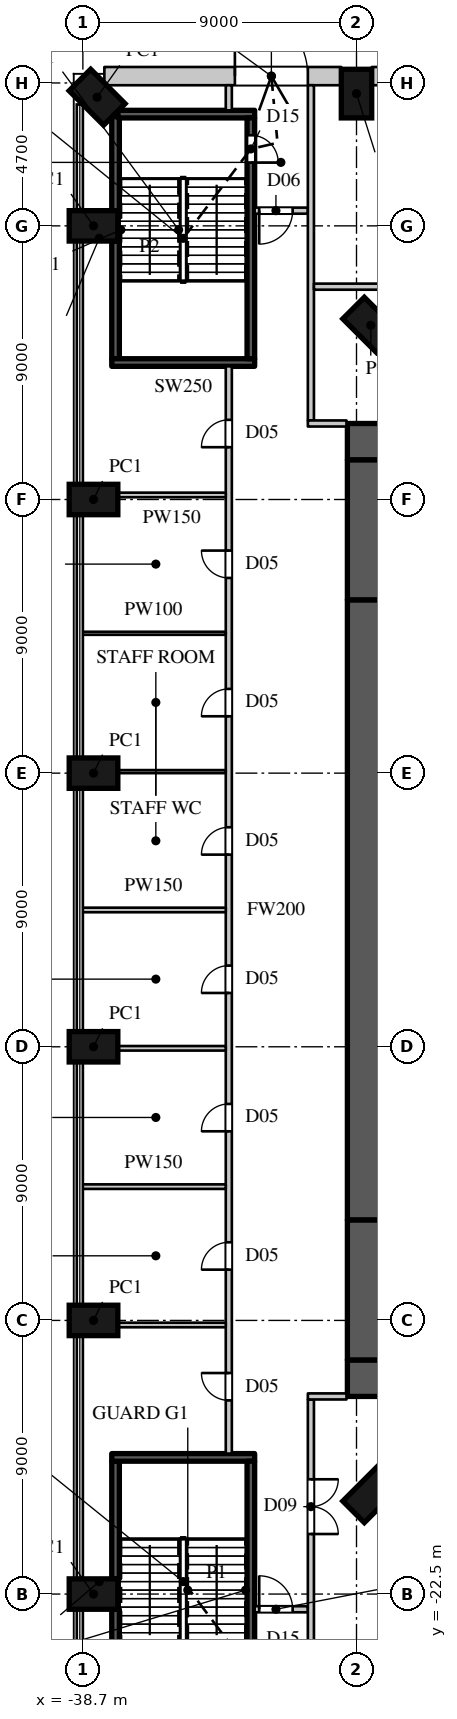
"""IFC4 building model, lengths in metres.
Left out: names, types, materials, properties, quantities, classifications, styles, units other than length and angle.
Written with IfcOpenShell. Run it as: python <this file> out.ifc"""

import sys

from ifc_helpers import new_model, si_unit, direction, frame, frame_2d, origin, origin_2d, place, context, subcontext, project, spatial, rectangle, extrude, element, fill, save


model = new_model("IFC4")
c1 = context("Model", 3, precision=1e-05, world=origin(), true_north=direction((0.0, 1.0)))
c2 = subcontext(c1, "Body", "Model", "MODEL_VIEW")
j1 = project(units=[si_unit("LENGTHUNIT", "METRE"), si_unit("PLANEANGLEUNIT", "RADIAN")], contexts=[c1])
p1 = place(None, origin())
s1 = spatial("IfcSite", under=j1, at=p1, CompositionType="ELEMENT")
p2 = place(p1, origin())
s2 = spatial("IfcBuilding", under=s1, at=p2, CompositionType="ELEMENT")
p3 = place(p2, origin())
s3 = spatial("IfcBuildingStorey", under=s2, at=p3, CompositionType="ELEMENT", Elevation=0.0)
for number, where, z_axis, x_axis in (
    (1, (-29.231, 19.231, 0.0), (0.0, 0.0, 1.0), (-0.707, -0.707, 0.0)),
    (2, (-29.231, -19.231, 0.0), (0.0, 0.0, 1.0), (0.707, -0.707, 0.0)),
    (3, (-29.7, 26.85, 0.0), (0.0, 0.0, 1.0), (-1.0, 0.0, 0.0)),
    (4, (-38.231, 26.731, 0.0), (0.0, 0.0, 1.0), (-0.707, -0.707, 0.0)),
    (5, (-38.35, 22.5, 0.0), (0.0, 0.0, 1.0), (0.0, -1.0, 0.0)),
    (6, (-38.35, 13.5, 0.0), (0.0, 0.0, 1.0), (0.0, -1.0, 0.0)),
    (7, (-38.35, 4.5, 0.0), (0.0, 0.0, 1.0), (0.0, -1.0, 0.0)),
    (8, (-38.35, -4.5, 0.0), (0.0, 0.0, 1.0), (0.0, -1.0, 0.0)),
    (9, (-38.35, -13.5, 0.0), (0.0, 0.0, 1.0), (0.0, -1.0, 0.0)),
    (10, (-38.35, -22.5, 0.0), (0.0, 0.0, 1.0), (0.0, -1.0, 0.0)),
):
    element("IfcColumn", number, at=place(p3, frame(where, z_axis=z_axis, x_axis=x_axis)), inside=s3, PredefinedType="COLUMN", context=c2, shape_type="SweptSolid", body=[
        extrude(rectangle(XDim=1.0, YDim=1.6, at=origin_2d()), origin(), (0.0, 0.0, 1.0), 9.0),
    ])
p4 = place(p3, frame((-21.15, 27.425, 0.0), z_axis=(0.0, 0.0, 1.0), x_axis=(-1.0, 0.0, 0.0)))
e11 = element("IfcWall", 11, at=p4, inside=s3, PredefinedType="ELEMENTEDWALL", context=c2, shape_type="SweptSolid", body=[
    extrude(rectangle(XDim=8.05, YDim=0.6, at=frame_2d((4.025, 0.0))), origin(), (0.0, 0.0, 1.0), 8.6),
])
p5 = place(p4, frame((4.45, 0.0, 0.0)))
e12 = element("IfcOpeningElement", 12, at=p5, cuts=e11, PredefinedType="OPENING", context=c2, shape_type="SweptSolid", body=[
    extrude(rectangle(XDim=2.4, YDim=3.0, at=frame_2d((1.2, 1.5))), frame((0.0, 0.31, 0.0), z_axis=(0.0, -1.0, 0.0), x_axis=(1.0, 0.0, 0.0)), (0.0, 0.0, 1.0), 0.62),
])
p6 = place(p3, frame((-37.993, 27.425, 0.0), z_axis=(0.0, 0.0, 1.0), x_axis=(1.0, 0.0, 0.0)))
e13 = element("IfcWall", 13, at=p6, inside=s3, PredefinedType="ELEMENTEDWALL", context=c2, shape_type="SweptSolid", body=[
    extrude(rectangle(XDim=7.793, YDim=0.6, at=frame_2d((3.896, 0.0))), origin(), (0.0, 0.0, 1.0), 8.6),
])
p7 = place(p6, frame((4.293, 0.0, 0.0)))
e14 = element("IfcOpeningElement", 14, at=p7, cuts=e13, PredefinedType="OPENING", context=c2, shape_type="SweptSolid", body=[
    extrude(rectangle(XDim=2.4, YDim=3.0, at=frame_2d((1.2, 1.5))), frame((0.0, 0.31, 0.0), z_axis=(0.0, -1.0, 0.0), x_axis=(1.0, 0.0, 0.0)), (0.0, 0.0, 1.0), 0.62),
])
for number, where, z_axis, x_axis in (
    (15, (-30.0, 15.4, 0.0), (0.0, 0.0, 1.0), (1.0, 0.0, 0.0)),
    (16, (-30.0, -15.4, 0.0), (0.0, 0.0, 1.0), (1.0, 0.0, 0.0)),
):
    element("IfcWall", number, at=place(p3, frame(where, z_axis=z_axis, x_axis=x_axis)), inside=s3, PredefinedType="SHEAR", context=c2, shape_type="SweptSolid", body=[
        extrude(rectangle(XDim=16.0, YDim=1.2, at=frame_2d((8.0, 0.0))), origin(), (0.0, 0.0, 1.0), 9.0),
    ])
p8 = place(p3, frame((-29.4, -10.2, 0.0), z_axis=(0.0, 0.0, 1.0), x_axis=(0.0, 1.0, 0.0)))
e17 = element("IfcWall", 17, at=p8, inside=s3, PredefinedType="SHEAR", context=c2, shape_type="SweptSolid", body=[
    extrude(rectangle(XDim=20.4, YDim=1.2, at=frame_2d((10.2, 0.0))), origin(), (0.0, 0.0, 1.0), 9.0),
])
for number, where, z_axis, x_axis in (
    (18, (-29.4, -14.8, 0.0), (0.0, 0.0, 1.0), (0.0, 1.0, 0.0)),
    (19, (-29.4, 10.2, 0.0), (0.0, 0.0, 1.0), (0.0, 1.0, 0.0)),
):
    element("IfcWall", number, at=place(p3, frame(where, z_axis=z_axis, x_axis=x_axis)), inside=s3, PredefinedType="SHEAR", context=c2, shape_type="SweptSolid", body=[
        extrude(rectangle(XDim=4.6, YDim=1.2, at=frame_2d((2.3, 0.0))), origin(), (0.0, 0.0, 1.0), 9.0),
    ])
p9 = place(p3, frame((-33.9, -17.88, 0.0), z_axis=(0.0, 0.0, 1.0), x_axis=(0.0, 1.0, 0.0)))
e20 = element("IfcWall", 20, at=p9, inside=s3, PredefinedType="PARTITIONING", context=c2, shape_type="SweptSolid", body=[
    extrude(rectangle(XDim=35.76, YDim=0.2, at=frame_2d((17.88, 0.0))), origin(), (0.0, 0.0, 1.0), 8.598),
])
p10 = place(p9, frame((1.75, 0.0, 0.0)))
e21 = element("IfcOpeningElement", 21, at=p10, cuts=e20, PredefinedType="OPENING", context=c2, shape_type="SweptSolid", body=[
    extrude(rectangle(XDim=0.9, YDim=2.2, at=frame_2d((0.45, 1.1))), frame((0.0, 0.11, 0.0), z_axis=(0.0, -1.0, 0.0), x_axis=(1.0, 0.0, 0.0)), (0.0, 0.0, 1.0), 0.22),
])
p11 = place(p9, frame((6.05, 0.0, 0.0)))
e22 = element("IfcOpeningElement", 22, at=p11, cuts=e20, PredefinedType="OPENING", context=c2, shape_type="SweptSolid", body=[
    extrude(rectangle(XDim=0.9, YDim=2.2, at=frame_2d((0.45, 1.1))), frame((0.0, 0.11, 0.0), z_axis=(0.0, -1.0, 0.0), x_axis=(1.0, 0.0, 0.0)), (0.0, 0.0, 1.0), 0.22),
])
p12 = place(p9, frame((10.6, 0.0, 0.0)))
e23 = element("IfcOpeningElement", 23, at=p12, cuts=e20, PredefinedType="OPENING", context=c2, shape_type="SweptSolid", body=[
    extrude(rectangle(XDim=0.9, YDim=2.2, at=frame_2d((0.45, 1.1))), frame((0.0, 0.11, 0.0), z_axis=(0.0, -1.0, 0.0), x_axis=(1.0, 0.0, 0.0)), (0.0, 0.0, 1.0), 0.22),
])
p13 = place(p9, frame((15.15, 0.0, 0.0)))
e24 = element("IfcOpeningElement", 24, at=p13, cuts=e20, PredefinedType="OPENING", context=c2, shape_type="SweptSolid", body=[
    extrude(rectangle(XDim=0.9, YDim=2.2, at=frame_2d((0.45, 1.1))), frame((0.0, 0.11, 0.0), z_axis=(0.0, -1.0, 0.0), x_axis=(1.0, 0.0, 0.0)), (0.0, 0.0, 1.0), 0.22),
])
p14 = place(p9, frame((19.7, 0.0, 0.0)))
e25 = element("IfcOpeningElement", 25, at=p14, cuts=e20, PredefinedType="OPENING", context=c2, shape_type="SweptSolid", body=[
    extrude(rectangle(XDim=0.9, YDim=2.2, at=frame_2d((0.45, 1.1))), frame((0.0, 0.11, 0.0), z_axis=(0.0, -1.0, 0.0), x_axis=(1.0, 0.0, 0.0)), (0.0, 0.0, 1.0), 0.22),
])
p15 = place(p9, frame((24.25, 0.0, 0.0)))
e26 = element("IfcOpeningElement", 26, at=p15, cuts=e20, PredefinedType="OPENING", context=c2, shape_type="SweptSolid", body=[
    extrude(rectangle(XDim=0.9, YDim=2.2, at=frame_2d((0.45, 1.1))), frame((0.0, 0.11, 0.0), z_axis=(0.0, -1.0, 0.0), x_axis=(1.0, 0.0, 0.0)), (0.0, 0.0, 1.0), 0.22),
])
p16 = place(p9, frame((28.8, 0.0, 0.0)))
e27 = element("IfcOpeningElement", 27, at=p16, cuts=e20, PredefinedType="OPENING", context=c2, shape_type="SweptSolid", body=[
    extrude(rectangle(XDim=0.9, YDim=2.2, at=frame_2d((0.45, 1.1))), frame((0.0, 0.11, 0.0), z_axis=(0.0, -1.0, 0.0), x_axis=(1.0, 0.0, 0.0)), (0.0, 0.0, 1.0), 0.22),
])
p17 = place(p9, frame((33.1, 0.0, 0.0)))
e28 = element("IfcOpeningElement", 28, at=p17, cuts=e20, PredefinedType="OPENING", context=c2, shape_type="SweptSolid", body=[
    extrude(rectangle(XDim=0.9, YDim=2.2, at=frame_2d((0.45, 1.1))), frame((0.0, 0.11, 0.0), z_axis=(0.0, -1.0, 0.0), x_axis=(1.0, 0.0, 0.0)), (0.0, 0.0, 1.0), 0.22),
])
p18 = place(p3, frame((-33.9, 26.3, 0.0), z_axis=(0.0, 0.0, 1.0), x_axis=(0.0, 1.0, 0.0)))
e29 = element("IfcWall", 29, at=p18, inside=s3, PredefinedType="PARTITIONING", context=c2, shape_type="SweptSolid", body=[
    extrude(rectangle(XDim=0.825, YDim=0.2, at=frame_2d((0.413, 0.0))), origin(), (0.0, 0.0, 1.0), 8.598),
])
p19 = place(p3, frame((-33.05, -23.0, 0.0), z_axis=(0.0, 0.0, 1.0), x_axis=(1.0, 0.0, 0.0)))
e30 = element("IfcWall", 30, at=p19, inside=s3, PredefinedType="PARTITIONING", context=c2, shape_type="SweptSolid", body=[
    extrude(rectangle(XDim=1.75, YDim=0.2, at=frame_2d((0.875, 0.0))), origin(), (0.0, 0.0, 1.0), 8.598),
])
p20 = place(p19, frame((0.15, 0.0, 0.0)))
e31 = element("IfcOpeningElement", 31, at=p20, cuts=e30, PredefinedType="OPENING", context=c2, shape_type="SweptSolid", body=[
    extrude(rectangle(XDim=1.1, YDim=2.2, at=frame_2d((0.55, 1.1))), frame((0.0, 0.11, 0.0), z_axis=(0.0, -1.0, 0.0), x_axis=(1.0, 0.0, 0.0)), (0.0, 0.0, 1.0), 0.22),
])
p21 = place(p3, frame((-33.05, 23.0, 0.0), z_axis=(0.0, 0.0, 1.0), x_axis=(1.0, 0.0, 0.0)))
e32 = element("IfcWall", 32, at=p21, inside=s3, PredefinedType="PARTITIONING", context=c2, shape_type="SweptSolid", body=[
    extrude(rectangle(XDim=1.75, YDim=0.2, at=frame_2d((0.875, 0.0))), origin(), (0.0, 0.0, 1.0), 8.598),
])
p22 = place(p21, frame((0.15, 0.0, 0.0)))
e33 = element("IfcOpeningElement", 33, at=p22, cuts=e32, PredefinedType="OPENING", context=c2, shape_type="SweptSolid", body=[
    extrude(rectangle(XDim=1.1, YDim=2.2, at=frame_2d((0.55, 1.1))), frame((0.0, 0.11, 0.0), z_axis=(0.0, -1.0, 0.0), x_axis=(1.0, 0.0, 0.0)), (0.0, 0.0, 1.0), 0.22),
])
p23 = place(p3, frame((-31.2, -27.125, 0.0), z_axis=(0.0, 0.0, 1.0), x_axis=(0.0, 1.0, 0.0)))
e34 = element("IfcWall", 34, at=p23, inside=s3, PredefinedType="PARTITIONING", context=c2, shape_type="SweptSolid", body=[
    extrude(rectangle(XDim=11.025, YDim=0.2, at=frame_2d((5.512, 0.0))), origin(), (0.0, 0.0, 1.0), 8.598),
])
p24 = place(p23, frame((6.6, 0.0, 0.0)))
e35 = element("IfcOpeningElement", 35, at=p24, cuts=e34, PredefinedType="OPENING", context=c2, shape_type="SweptSolid", body=[
    extrude(rectangle(XDim=1.8, YDim=2.4, at=frame_2d((0.9, 1.2))), frame((0.0, 0.11, 0.0), z_axis=(0.0, -1.0, 0.0), x_axis=(1.0, 0.0, 0.0)), (0.0, 0.0, 1.0), 0.22),
])
p25 = place(p3, frame((-31.3, -16.0, 0.0), z_axis=(0.0, 0.0, 1.0), x_axis=(1.0, 0.0, 0.0)))
e36 = element("IfcWall", 36, at=p25, inside=s3, PredefinedType="PARTITIONING", context=c2, shape_type="SweptSolid", body=[
    extrude(rectangle(XDim=1.27, YDim=0.2, at=frame_2d((0.635, 0.0))), origin(), (0.0, 0.0, 1.0), 8.598),
])
p26 = place(p3, frame((-31.2, 16.1, 0.0), z_axis=(0.0, 0.0, 1.0), x_axis=(0.0, 1.0, 0.0)))
e37 = element("IfcWall", 37, at=p26, inside=s3, PredefinedType="PARTITIONING", context=c2, shape_type="SweptSolid", body=[
    extrude(rectangle(XDim=11.025, YDim=0.2, at=frame_2d((5.512, 0.0))), origin(), (0.0, 0.0, 1.0), 8.598),
])
p27 = place(p3, frame((-31.3, 16.0, 0.0), z_axis=(0.0, 0.0, 1.0), x_axis=(1.0, 0.0, 0.0)))
e38 = element("IfcWall", 38, at=p27, inside=s3, PredefinedType="PARTITIONING", context=c2, shape_type="SweptSolid", body=[
    extrude(rectangle(XDim=1.27, YDim=0.2, at=frame_2d((0.635, 0.0))), origin(), (0.0, 0.0, 1.0), 8.598),
])
p28 = place(p3, frame((-31.1, 20.5, 0.0), z_axis=(0.0, 0.0, 1.0), x_axis=(1.0, 0.0, 0.0)))
e39 = element("IfcWall", 39, at=p28, inside=s3, PredefinedType="PARTITIONING", context=c2, shape_type="SweptSolid", body=[
    extrude(rectangle(XDim=5.0, YDim=0.2, at=frame_2d((2.5, 0.0))), origin(), (0.0, 0.0, 1.0), 8.598),
])
p29 = place(p28, frame((2.35, 0.0, 0.0)))
e40 = element("IfcOpeningElement", 40, at=p29, cuts=e39, PredefinedType="OPENING", context=c2, shape_type="SweptSolid", body=[
    extrude(rectangle(XDim=0.95, YDim=2.2, at=frame_2d((0.475, 1.1))), frame((0.0, 0.11, 0.0), z_axis=(0.0, -1.0, 0.0), x_axis=(1.0, 0.0, 0.0)), (0.0, 0.0, 1.0), 0.22),
])
p30 = place(p3, frame((-37.55, -13.65, 0.0), z_axis=(0.0, 0.0, 1.0), x_axis=(1.0, 0.0, 0.0)))
e41 = element("IfcWall", 41, at=p30, inside=s3, PredefinedType="PARTITIONING", context=c2, shape_type="SweptSolid", body=[
    extrude(rectangle(XDim=3.55, YDim=0.15, at=frame_2d((1.775, 0.0))), origin(), (0.0, 0.0, 1.0), 8.598),
])
p31 = place(p3, frame((-38.755, -9.1, 0.0), z_axis=(0.0, 0.0, 1.0), x_axis=(1.0, 0.0, 0.0)))
e42 = element("IfcWall", 42, at=p31, inside=s3, PredefinedType="PARTITIONING", context=c2, shape_type="SweptSolid", body=[
    extrude(rectangle(XDim=4.755, YDim=0.15, at=frame_2d((2.377, 0.0))), origin(), (0.0, 0.0, 1.0), 8.598),
])
p32 = place(p3, frame((-37.55, -4.55, 0.0), z_axis=(0.0, 0.0, 1.0), x_axis=(1.0, 0.0, 0.0)))
e43 = element("IfcWall", 43, at=p32, inside=s3, PredefinedType="PARTITIONING", context=c2, shape_type="SweptSolid", body=[
    extrude(rectangle(XDim=3.55, YDim=0.15, at=frame_2d((1.775, 0.0))), origin(), (0.0, 0.0, 1.0), 8.598),
])
p33 = place(p3, frame((-38.755, 0.0, 0.0), z_axis=(0.0, 0.0, 1.0), x_axis=(1.0, 0.0, 0.0)))
e44 = element("IfcWall", 44, at=p33, inside=s3, PredefinedType="PARTITIONING", context=c2, shape_type="SweptSolid", body=[
    extrude(rectangle(XDim=4.755, YDim=0.15, at=frame_2d((2.377, 0.0))), origin(), (0.0, 0.0, 1.0), 8.598),
])
p34 = place(p3, frame((-37.55, 13.65, 0.0), z_axis=(0.0, 0.0, 1.0), x_axis=(1.0, 0.0, 0.0)))
e45 = element("IfcWall", 45, at=p34, inside=s3, PredefinedType="PARTITIONING", context=c2, shape_type="SweptSolid", body=[
    extrude(rectangle(XDim=3.55, YDim=0.15, at=frame_2d((1.775, 0.0))), origin(), (0.0, 0.0, 1.0), 8.598),
])
p35 = place(p3, frame((-37.625, -26.095, 0.0), z_axis=(0.0, 0.0, 1.0), x_axis=(0.0, 1.0, 0.0)))
e46 = element("IfcWall", 46, at=p35, inside=s3, PredefinedType="SHEAR", context=c2, shape_type="SweptSolid", body=[
    extrude(rectangle(XDim=3.095, YDim=0.25, at=frame_2d((1.548, 0.0))), origin(), (0.0, 0.0, 1.0), 8.6),
])
p36 = place(p3, frame((-37.625, -22.0, 0.0), z_axis=(0.0, 0.0, 1.0), x_axis=(0.0, 1.0, 0.0)))
e47 = element("IfcWall", 47, at=p36, inside=s3, PredefinedType="SHEAR", context=c2, shape_type="SweptSolid", body=[
    extrude(rectangle(XDim=3.87, YDim=0.25, at=frame_2d((1.935, 0.0))), origin(), (0.0, 0.0, 1.0), 8.6),
])
p37 = place(p3, frame((-37.75, -18.005, 0.0), z_axis=(0.0, 0.0, 1.0), x_axis=(1.0, 0.0, 0.0)))
e48 = element("IfcWall", 48, at=p37, inside=s3, PredefinedType="SHEAR", context=c2, shape_type="SweptSolid", body=[
    extrude(rectangle(XDim=4.7, YDim=0.25, at=frame_2d((2.35, 0.0))), origin(), (0.0, 0.0, 1.0), 8.6),
])
p38 = place(p3, frame((-37.625, 18.13, 0.0), z_axis=(0.0, 0.0, 1.0), x_axis=(0.0, 1.0, 0.0)))
e49 = element("IfcWall", 49, at=p38, inside=s3, PredefinedType="SHEAR", context=c2, shape_type="SweptSolid", body=[
    extrude(rectangle(XDim=3.87, YDim=0.25, at=frame_2d((1.935, 0.0))), origin(), (0.0, 0.0, 1.0), 8.6),
])
p39 = place(p3, frame((-37.625, 23.0, 0.0), z_axis=(0.0, 0.0, 1.0), x_axis=(0.0, 1.0, 0.0)))
e50 = element("IfcWall", 50, at=p39, inside=s3, PredefinedType="SHEAR", context=c2, shape_type="SweptSolid", body=[
    extrude(rectangle(XDim=3.095, YDim=0.25, at=frame_2d((1.548, 0.0))), origin(), (0.0, 0.0, 1.0), 8.6),
])
p40 = place(p3, frame((-37.75, 18.005, 0.0), z_axis=(0.0, 0.0, 1.0), x_axis=(1.0, 0.0, 0.0)))
e51 = element("IfcWall", 51, at=p40, inside=s3, PredefinedType="SHEAR", context=c2, shape_type="SweptSolid", body=[
    extrude(rectangle(XDim=4.7, YDim=0.25, at=frame_2d((2.35, 0.0))), origin(), (0.0, 0.0, 1.0), 8.6),
])
p41 = place(p3, frame((-37.545, 26.175, 0.0), z_axis=(0.0, 0.0, 1.0), x_axis=(1.0, 0.0, 0.0)))
e52 = element("IfcWall", 52, at=p41, inside=s3, PredefinedType="SHEAR", context=c2, shape_type="SweptSolid", body=[
    extrude(rectangle(XDim=4.495, YDim=0.25, at=frame_2d((2.248, 0.0))), origin(), (0.0, 0.0, 1.0), 8.6),
])
p42 = place(p3, frame((-33.175, -26.05, 0.0), z_axis=(0.0, 0.0, 1.0), x_axis=(0.0, 1.0, 0.0)))
e53 = element("IfcWall", 53, at=p42, inside=s3, PredefinedType="SHEAR", context=c2, shape_type="SweptSolid", body=[
    extrude(rectangle(XDim=7.92, YDim=0.25, at=frame_2d((3.96, 0.0))), origin(), (0.0, 0.0, 1.0), 8.6),
])
p43 = place(p42, frame((0.55, 0.0, 0.0)))
e54 = element("IfcOpeningElement", 54, at=p43, cuts=e53, PredefinedType="OPENING", context=c2, shape_type="SweptSolid", body=[
    extrude(rectangle(XDim=0.9, YDim=2.2, at=frame_2d((0.45, 1.1))), frame((0.0, 0.135, 0.0), z_axis=(0.0, -1.0, 0.0), x_axis=(1.0, 0.0, 0.0)), (0.0, 0.0, 1.0), 0.27),
])
p44 = place(p3, frame((-33.175, 18.13, 0.0), z_axis=(0.0, 0.0, 1.0), x_axis=(0.0, 1.0, 0.0)))
e55 = element("IfcWall", 55, at=p44, inside=s3, PredefinedType="SHEAR", context=c2, shape_type="SweptSolid", body=[
    extrude(rectangle(XDim=7.92, YDim=0.25, at=frame_2d((3.96, 0.0))), origin(), (0.0, 0.0, 1.0), 8.6),
])
p45 = place(p44, frame((6.45, 0.0, 0.0)))
e56 = element("IfcOpeningElement", 56, at=p45, cuts=e55, PredefinedType="OPENING", context=c2, shape_type="SweptSolid", body=[
    extrude(rectangle(XDim=0.9, YDim=2.2, at=frame_2d((0.45, 1.1))), frame((0.0, 0.135, 0.0), z_axis=(0.0, -1.0, 0.0), x_axis=(1.0, 0.0, 0.0)), (0.0, 0.0, 1.0), 0.27),
])
p46 = place(p3, frame((-37.55, 4.55, 0.0), z_axis=(0.0, 0.0, 1.0), x_axis=(1.0, 0.0, 0.0)))
e57 = element("IfcWall", 57, at=p46, inside=s3, PredefinedType="PARTITIONING", context=c2, shape_type="SweptSolid", body=[
    extrude(rectangle(XDim=3.55, YDim=0.1, at=frame_2d((1.775, 0.0))), origin(), (0.0, 0.0, 1.0), 8.598),
])
p47 = place(p3, frame((-38.755, 9.1, 0.0), z_axis=(0.0, 0.0, 1.0), x_axis=(1.0, 0.0, 0.0)))
e58 = element("IfcWall", 58, at=p47, inside=s3, PredefinedType="PARTITIONING", context=c2, shape_type="SweptSolid", body=[
    extrude(rectangle(XDim=4.755, YDim=0.1, at=frame_2d((2.377, 0.0))), origin(), (0.0, 0.0, 1.0), 8.598),
])
p48 = place(p7, origin())
e59 = element("IfcDoor", 59, at=p48, inside=s3, OperationType="DOUBLE_DOOR_SINGLE_SWING", PredefinedType="DOOR", context=c2, shape_type="SweptSolid", body=[
    extrude(rectangle(XDim=2.4, YDim=3.0, at=frame_2d((1.2, 1.5))), frame((0.0, -0.05, 0.0), z_axis=(0.0, -1.0, 0.0), x_axis=(1.0, 0.0, 0.0)), (0.0, 0.0, 1.0), 0.05),
])
fill(e14, e59)
p49 = place(p10, origin())
e60 = element("IfcDoor", 60, at=p49, inside=s3, OperationType="SINGLE_SWING_RIGHT", PredefinedType="DOOR", context=c2, shape_type="SweptSolid", body=[
    extrude(rectangle(XDim=0.9, YDim=2.2, at=frame_2d((0.45, 1.1))), frame((0.0, 0.025, 0.0), z_axis=(0.0, -1.0, 0.0), x_axis=(1.0, 0.0, 0.0)), (0.0, 0.0, 1.0), 0.05),
])
fill(e21, e60)
p50 = place(p11, origin())
e61 = element("IfcDoor", 61, at=p50, inside=s3, OperationType="SINGLE_SWING_LEFT", PredefinedType="DOOR", context=c2, shape_type="SweptSolid", body=[
    extrude(rectangle(XDim=0.9, YDim=2.2, at=frame_2d((0.45, 1.1))), frame((0.0, 0.025, 0.0), z_axis=(0.0, -1.0, 0.0), x_axis=(1.0, 0.0, 0.0)), (0.0, 0.0, 1.0), 0.05),
])
fill(e22, e61)
p51 = place(p12, origin())
e62 = element("IfcDoor", 62, at=p51, inside=s3, OperationType="SINGLE_SWING_LEFT", PredefinedType="DOOR", context=c2, shape_type="SweptSolid", body=[
    extrude(rectangle(XDim=0.9, YDim=2.2, at=frame_2d((0.45, 1.1))), frame((0.0, 0.025, 0.0), z_axis=(0.0, -1.0, 0.0), x_axis=(1.0, 0.0, 0.0)), (0.0, 0.0, 1.0), 0.05),
])
fill(e23, e62)
p52 = place(p13, origin())
e63 = element("IfcDoor", 63, at=p52, inside=s3, OperationType="SINGLE_SWING_LEFT", PredefinedType="DOOR", context=c2, shape_type="SweptSolid", body=[
    extrude(rectangle(XDim=0.9, YDim=2.2, at=frame_2d((0.45, 1.1))), frame((0.0, 0.025, 0.0), z_axis=(0.0, -1.0, 0.0), x_axis=(1.0, 0.0, 0.0)), (0.0, 0.0, 1.0), 0.05),
])
fill(e24, e63)
p53 = place(p14, origin())
e64 = element("IfcDoor", 64, at=p53, inside=s3, OperationType="SINGLE_SWING_LEFT", PredefinedType="DOOR", context=c2, shape_type="SweptSolid", body=[
    extrude(rectangle(XDim=0.9, YDim=2.2, at=frame_2d((0.45, 1.1))), frame((0.0, 0.025, 0.0), z_axis=(0.0, -1.0, 0.0), x_axis=(1.0, 0.0, 0.0)), (0.0, 0.0, 1.0), 0.05),
])
fill(e25, e64)
p54 = place(p15, origin())
e65 = element("IfcDoor", 65, at=p54, inside=s3, OperationType="SINGLE_SWING_LEFT", PredefinedType="DOOR", context=c2, shape_type="SweptSolid", body=[
    extrude(rectangle(XDim=0.9, YDim=2.2, at=frame_2d((0.45, 1.1))), frame((0.0, 0.025, 0.0), z_axis=(0.0, -1.0, 0.0), x_axis=(1.0, 0.0, 0.0)), (0.0, 0.0, 1.0), 0.05),
])
fill(e26, e65)
p55 = place(p16, origin())
e66 = element("IfcDoor", 66, at=p55, inside=s3, OperationType="SINGLE_SWING_RIGHT", PredefinedType="DOOR", context=c2, shape_type="SweptSolid", body=[
    extrude(rectangle(XDim=0.9, YDim=2.2, at=frame_2d((0.45, 1.1))), frame((0.0, 0.025, 0.0), z_axis=(0.0, -1.0, 0.0), x_axis=(1.0, 0.0, 0.0)), (0.0, 0.0, 1.0), 0.05),
])
fill(e27, e66)
p56 = place(p17, origin())
e67 = element("IfcDoor", 67, at=p56, inside=s3, OperationType="SINGLE_SWING_LEFT", PredefinedType="DOOR", context=c2, shape_type="SweptSolid", body=[
    extrude(rectangle(XDim=0.9, YDim=2.2, at=frame_2d((0.45, 1.1))), frame((0.0, 0.025, 0.0), z_axis=(0.0, -1.0, 0.0), x_axis=(1.0, 0.0, 0.0)), (0.0, 0.0, 1.0), 0.05),
])
fill(e28, e67)
p57 = place(p24, origin())
e68 = element("IfcDoor", 68, at=p57, inside=s3, OperationType="DOUBLE_DOOR_SINGLE_SWING", PredefinedType="DOOR", context=c2, shape_type="SweptSolid", body=[
    extrude(rectangle(XDim=1.8, YDim=2.4, at=frame_2d((0.9, 1.2))), frame((0.0, 0.025, 0.0), z_axis=(0.0, -1.0, 0.0), x_axis=(1.0, 0.0, 0.0)), (0.0, 0.0, 1.0), 0.05),
])
fill(e35, e68)
p58 = place(p20, origin())
e69 = element("IfcDoor", 69, at=p58, inside=s3, OperationType="SINGLE_SWING_LEFT", PredefinedType="DOOR", context=c2, shape_type="SweptSolid", body=[
    extrude(rectangle(XDim=1.1, YDim=2.2, at=frame_2d((0.55, 1.1))), frame((0.0, 0.025, 0.0), z_axis=(0.0, -1.0, 0.0), x_axis=(1.0, 0.0, 0.0)), (0.0, 0.0, 1.0), 0.05),
])
fill(e31, e69)
p59 = place(p22, origin())
e70 = element("IfcDoor", 70, at=p59, inside=s3, OperationType="SINGLE_SWING_RIGHT", PredefinedType="DOOR", context=c2, shape_type="SweptSolid", body=[
    extrude(rectangle(XDim=1.1, YDim=2.2, at=frame_2d((0.55, 1.1))), frame((0.0, 0.025, 0.0), z_axis=(0.0, -1.0, 0.0), x_axis=(1.0, 0.0, 0.0)), (0.0, 0.0, 1.0), 0.05),
])
fill(e33, e70)
p60 = place(p45, origin())
e71 = element("IfcDoor", 71, at=p60, inside=s3, OperationType="SINGLE_SWING_RIGHT", PredefinedType="DOOR", context=c2, shape_type="SweptSolid", body=[
    extrude(rectangle(XDim=0.9, YDim=2.2, at=frame_2d((0.45, 1.1))), frame((0.0, 0.025, 0.0), z_axis=(0.0, -1.0, 0.0), x_axis=(1.0, 0.0, 0.0)), (0.0, 0.0, 1.0), 0.05),
])
fill(e56, e71)
save(model, sys.argv[1])
